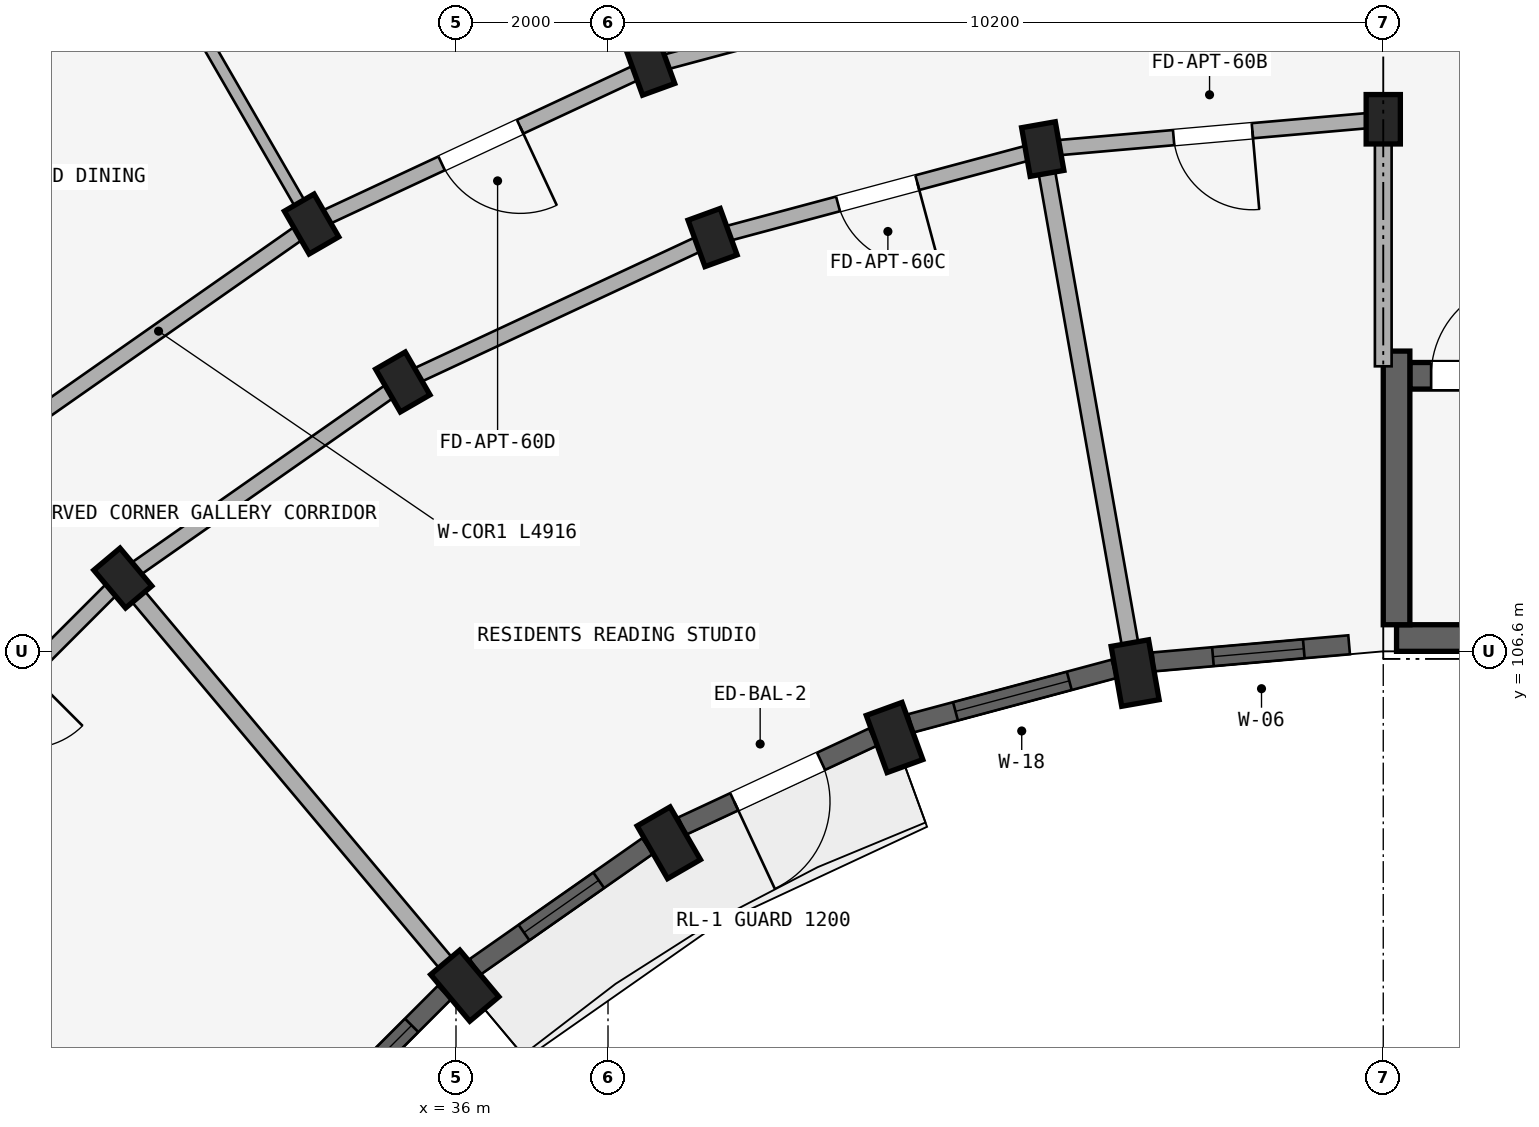
"""IFC4 building model, lengths in metres.
Left out: names, types, materials, properties, quantities, classifications, styles, units other than length and angle.
Written with IfcOpenShell. Run it as: python <this file> out.ifc"""

import sys

from ifc_helpers import new_model, si_unit, direction, frame, frame_2d, origin, origin_2d, place, context, subcontext, project, spatial, rectangle, extrude, element, fill, save


model = new_model("IFC4")
c1 = context("Model", 3, precision=1e-05, world=origin(), true_north=direction((0.0, 1.0)))
c2 = subcontext(c1, "Body", "Model", "MODEL_VIEW")
j1 = project(units=[si_unit("LENGTHUNIT", "METRE"), si_unit("PLANEANGLEUNIT", "RADIAN")], contexts=[c1])
p1 = place(None, origin())
s1 = spatial("IfcSite", under=j1, at=p1, CompositionType="ELEMENT")
p2 = place(p1, origin())
s2 = spatial("IfcBuilding", under=s1, at=p2, CompositionType="ELEMENT")
p3 = place(p2, frame((0.0, 0.0, 27.6)))
s3 = spatial("IfcBuildingStorey", under=s2, at=p3, CompositionType="ELEMENT", Elevation=27.6)
p4 = place(p3, frame((48.375, 106.775, 0.0), z_axis=(0.0, 0.0, 1.0), x_axis=(1.0, 0.0, 0.0)))
e1 = element("IfcWall", 1, at=p4, inside=s3, PredefinedType="SHEAR", context=c2, shape_type="SweptSolid", body=[
    extrude(rectangle(XDim=8.25, YDim=0.35, at=frame_2d((4.125, 0.0))), origin(), (0.0, 0.0, 1.0), 2.93),
])
p5 = place(p3, frame((48.55, 110.225, 0.0), z_axis=(0.0, 0.0, 1.0), x_axis=(1.0, 0.0, 0.0)))
e2 = element("IfcWall", 2, at=p5, inside=s3, PredefinedType="SHEAR", context=c2, shape_type="SweptSolid", body=[
    extrude(rectangle(XDim=7.9, YDim=0.35, at=frame_2d((3.95, 0.0))), origin(), (0.0, 0.0, 1.0), 2.93),
])
p6 = place(p5, frame((0.28, 0.0, 0.0)))
e3 = element("IfcOpeningElement", 3, at=p6, cuts=e2, PredefinedType="OPENING", context=c2, shape_type="SweptSolid", body=[
    extrude(rectangle(XDim=1.24, YDim=2.15, at=frame_2d((0.62, 1.075))), frame((0.0, 0.185, 0.0), z_axis=(0.0, -1.0, 0.0), x_axis=(1.0, 0.0, 0.0)), (0.0, 0.0, 1.0), 0.37),
])
p7 = place(p3, frame((48.375, 106.95, 0.0), z_axis=(0.0, 0.0, 1.0), x_axis=(0.0, 1.0, 0.0)))
e4 = element("IfcWall", 4, at=p7, inside=s3, PredefinedType="SHEAR", context=c2, shape_type="SweptSolid", body=[
    extrude(rectangle(XDim=3.6, YDim=0.35, at=frame_2d((1.8, 0.0))), origin(), (0.0, 0.0, 1.0), 2.93),
])
p8 = place(p3, frame((48.2, 113.6, 0.0), z_axis=(0.0, 0.0, 1.0), x_axis=(1.0, 0.0, 0.0)))
e5 = element("IfcColumn", 5, at=p8, inside=s3, PredefinedType="COLUMN", context=c2, shape_type="SweptSolid", body=[
    extrude(rectangle(XDim=0.45, YDim=0.65, at=origin_2d()), origin(), (0.0, 0.0, 1.0), 2.93),
])
p9 = place(p3, frame((44.935, 106.314, 0.0), z_axis=(0.0, 0.0, 1.0), x_axis=(0.984807753012, 0.173648177667, 0.0)))
e6 = element("IfcColumn", 6, at=p9, inside=s3, PredefinedType="COLUMN", context=c2, shape_type="SweptSolid", body=[
    extrude(rectangle(XDim=0.5, YDim=0.8, at=origin_2d()), origin(), (0.0, 0.0, 1.0), 2.93),
])
p10 = place(p3, frame((43.72, 113.208, 0.0), z_axis=(0.0, 0.0, 1.0), x_axis=(0.984807753012, 0.173648177667, 0.0)))
e7 = element("IfcColumn", 7, at=p10, inside=s3, PredefinedType="COLUMN", context=c2, shape_type="SweptSolid", body=[
    extrude(rectangle(XDim=0.45, YDim=0.65, at=origin_2d()), origin(), (0.0, 0.0, 1.0), 2.93),
])
p11 = place(p3, frame((41.77, 105.466, 0.0), z_axis=(0.0, 0.0, 1.0), x_axis=(0.939692620786, 0.342020143326, 0.0)))
e8 = element("IfcColumn", 8, at=p11, inside=s3, PredefinedType="COLUMN", context=c2, shape_type="SweptSolid", body=[
    extrude(rectangle(XDim=0.5, YDim=0.8, at=origin_2d()), origin(), (0.0, 0.0, 1.0), 2.93),
])
for number, where, z_axis, x_axis in (
    (9, (39.376, 112.044, 0.0), (0.0, 0.0, 1.0), (0.94, 0.342, 0.0)),
    (10, (38.555, 114.299, 0.0), (0.0, 0.0, 1.0), (0.94, 0.342, 0.0)),
):
    element("IfcColumn", number, at=place(p3, frame(where, z_axis=z_axis, x_axis=x_axis)), inside=s3, PredefinedType="COLUMN", context=c2, shape_type="SweptSolid", body=[
        extrude(rectangle(XDim=0.45, YDim=0.65, at=origin_2d()), origin(), (0.0, 0.0, 1.0), 2.93),
    ])
p12 = place(p3, frame((38.8, 104.081, 0.0), z_axis=(0.0, 0.0, 1.0), x_axis=(0.866025403784, 0.5, 0.0)))
e11 = element("IfcColumn", 11, at=p12, inside=s3, PredefinedType="COLUMN", context=c2, shape_type="SweptSolid", body=[
    extrude(rectangle(XDim=0.5, YDim=0.8, at=origin_2d()), origin(), (0.0, 0.0, 1.0), 2.93),
])
for number, where, z_axis, x_axis in (
    (12, (35.3, 110.144, 0.0), (0.0, 0.0, 1.0), (0.866, 0.5, 0.0)),
    (13, (34.1, 112.222, 0.0), (0.0, 0.0, 1.0), (0.866, 0.5, 0.0)),
):
    element("IfcColumn", number, at=place(p3, frame(where, z_axis=z_axis, x_axis=x_axis)), inside=s3, PredefinedType="COLUMN", context=c2, shape_type="SweptSolid", body=[
        extrude(rectangle(XDim=0.45, YDim=0.65, at=origin_2d()), origin(), (0.0, 0.0, 1.0), 2.93),
    ])
p13 = place(p3, frame((36.115, 102.202, 0.0), z_axis=(0.0, 0.0, 1.0), x_axis=(0.766044443119, 0.642787609687, 0.0)))
e14 = element("IfcColumn", 14, at=p13, inside=s3, PredefinedType="COLUMN", context=c2, shape_type="SweptSolid", body=[
    extrude(rectangle(XDim=0.5, YDim=0.8, at=origin_2d()), origin(), (0.0, 0.0, 1.0), 2.93),
])
p14 = place(p3, frame((31.616, 107.564, 0.0), z_axis=(0.0, 0.0, 1.0), x_axis=(0.766044443119, 0.642787609687, 0.0)))
e15 = element("IfcColumn", 15, at=p14, inside=s3, PredefinedType="COLUMN", context=c2, shape_type="SweptSolid", body=[
    extrude(rectangle(XDim=0.45, YDim=0.65, at=origin_2d()), origin(), (0.0, 0.0, 1.0), 2.93),
])
p15 = place(p3, frame((48.2, 113.6, 0.0), z_axis=(0.0, 0.0, 1.0), x_axis=(-0.996191949488, -0.087187153726, 0.0)))
e16 = element("IfcWall", 16, at=p15, inside=s3, PredefinedType="STANDARD", context=c2, shape_type="SweptSolid", body=[
    extrude(rectangle(XDim=4.497, YDim=0.2, at=frame_2d((2.249, 0.0))), origin(), (0.0, 0.0, 1.0), 2.372),
])
p16 = place(p15, frame((1.729, 0.0, 0.0)))
e17 = element("IfcOpeningElement", 17, at=p16, cuts=e16, PredefinedType="OPENING", context=c2, shape_type="SweptSolid", body=[
    extrude(rectangle(XDim=1.04, YDim=2.15, at=frame_2d((0.52, 1.075))), frame((0.0, 0.11, 0.0), z_axis=(0.0, -1.0, 0.0), x_axis=(1.0, 0.0, 0.0)), (0.0, 0.0, 1.0), 0.22),
])
p17 = place(p3, frame((43.72, 113.208, 0.0), z_axis=(0.0, 0.0, 1.0), x_axis=(-0.965934240054, -0.258787642463, 0.0)))
e18 = element("IfcWall", 18, at=p17, inside=s3, PredefinedType="STANDARD", context=c2, shape_type="SweptSolid", body=[
    extrude(rectangle(XDim=4.497, YDim=0.2, at=frame_2d((2.249, 0.0))), origin(), (0.0, 0.0, 1.0), 2.372),
])
p18 = place(p17, frame((1.709, 0.0, 0.0)))
e19 = element("IfcOpeningElement", 19, at=p18, cuts=e18, PredefinedType="OPENING", context=c2, shape_type="SweptSolid", body=[
    extrude(rectangle(XDim=1.08, YDim=2.15, at=frame_2d((0.54, 1.075))), frame((0.0, 0.11, 0.0), z_axis=(0.0, -1.0, 0.0), x_axis=(1.0, 0.0, 0.0)), (0.0, 0.0, 1.0), 0.22),
])
p19 = place(p3, frame((43.303, 115.572, 0.0), z_axis=(0.0, 0.0, 1.0), x_axis=(-0.965930095386, -0.258803112091, 0.0)))
e20 = element("IfcWall", 20, at=p19, inside=s3, PredefinedType="STANDARD", context=c2, shape_type="SweptSolid", body=[
    extrude(rectangle(XDim=4.916, YDim=0.2, at=frame_2d((2.458, 0.0))), origin(), (0.0, 0.0, 1.0), 2.372),
])
p20 = place(p3, frame((39.376, 112.044, 0.0), z_axis=(0.0, 0.0, 1.0), x_axis=(-0.906307919131, -0.422617978463, 0.0)))
e21 = element("IfcWall", 21, at=p20, inside=s3, PredefinedType="STANDARD", context=c2, shape_type="SweptSolid", body=[
    extrude(rectangle(XDim=4.497, YDim=0.2, at=frame_2d((2.249, 0.0))), origin(), (0.0, 0.0, 1.0), 2.372),
])
p21 = place(p3, frame((38.555, 114.299, 0.0), z_axis=(0.0, 0.0, 1.0), x_axis=(-0.906302381024, -0.422629854778, 0.0)))
e22 = element("IfcWall", 22, at=p21, inside=s3, PredefinedType="STANDARD", context=c2, shape_type="SweptSolid", body=[
    extrude(rectangle(XDim=4.915, YDim=0.2, at=frame_2d((2.458, 0.0))), origin(), (0.0, 0.0, 1.0), 2.372),
])
p22 = place(p21, frame((1.888, 0.0, 0.0)))
e23 = element("IfcOpeningElement", 23, at=p22, cuts=e22, PredefinedType="OPENING", context=c2, shape_type="SweptSolid", body=[
    extrude(rectangle(XDim=1.14, YDim=2.15, at=frame_2d((0.57, 1.075))), frame((0.0, 0.11, 0.0), z_axis=(0.0, -1.0, 0.0), x_axis=(1.0, 0.0, 0.0)), (0.0, 0.0, 1.0), 0.22),
])
p23 = place(p3, frame((35.3, 110.144, 0.0), z_axis=(0.0, 0.0, 1.0), x_axis=(-0.819155404658, -0.573571637217, 0.0)))
e24 = element("IfcWall", 24, at=p23, inside=s3, PredefinedType="STANDARD", context=c2, shape_type="SweptSolid", body=[
    extrude(rectangle(XDim=4.497, YDim=0.2, at=frame_2d((2.249, 0.0))), origin(), (0.0, 0.0, 1.0), 2.372),
])
p24 = place(p3, frame((34.1, 112.222, 0.0), z_axis=(0.0, 0.0, 1.0), x_axis=(-0.819140911474, -0.573592335331, 0.0)))
e25 = element("IfcWall", 25, at=p24, inside=s3, PredefinedType="STANDARD", context=c2, shape_type="SweptSolid", body=[
    extrude(rectangle(XDim=4.916, YDim=0.2, at=frame_2d((2.458, 0.0))), origin(), (0.0, 0.0, 1.0), 2.372),
])
p25 = place(p3, frame((31.616, 107.564, 0.0), z_axis=(0.0, 0.0, 1.0), x_axis=(-0.707106781187, -0.707106781187, 0.0)))
e26 = element("IfcWall", 26, at=p25, inside=s3, PredefinedType="STANDARD", context=c2, shape_type="SweptSolid", body=[
    extrude(rectangle(XDim=4.497, YDim=0.2, at=frame_2d((2.249, 0.0))), origin(), (0.0, 0.0, 1.0), 2.372),
])
p26 = place(p25, frame((1.749, 0.0, 0.0)))
e27 = element("IfcOpeningElement", 27, at=p26, cuts=e26, PredefinedType="OPENING", context=c2, shape_type="SweptSolid", body=[
    extrude(rectangle(XDim=1.0, YDim=2.15, at=frame_2d((0.5, 1.075))), frame((0.0, 0.11, 0.0), z_axis=(0.0, -1.0, 0.0), x_axis=(1.0, 0.0, 0.0)), (0.0, 0.0, 1.0), 0.22),
])
p27 = place(p3, frame((48.2, 110.35, 0.0), z_axis=(0.0, 0.0, 1.0), x_axis=(0.0, 1.0, 0.0)))
e28 = element("IfcWall", 28, at=p27, inside=s3, PredefinedType="STANDARD", context=c2, shape_type="SweptSolid", body=[
    extrude(rectangle(XDim=3.2, YDim=0.22, at=frame_2d((1.6, 0.0))), origin(), (0.0, 0.0, 1.0), 2.372),
])
p28 = place(p3, frame((44.901, 106.511, 0.0), z_axis=(0.0, 0.0, 1.0), x_axis=(-0.173647089161, 0.984807944945, 0.0)))
e29 = element("IfcWall", 29, at=p28, inside=s3, PredefinedType="STANDARD", context=c2, shape_type="SweptSolid", body=[
    extrude(rectangle(XDim=6.75, YDim=0.22, at=frame_2d((3.375, 0.0))), origin(), (0.0, 0.0, 1.0), 2.372),
])
p29 = place(p3, frame((38.521, 114.393, 0.0), z_axis=(0.0, 0.0, 1.0), x_axis=(-0.342022120477, 0.939691901159, 0.0)))
e30 = element("IfcWall", 30, at=p29, inside=s3, PredefinedType="STANDARD", context=c2, shape_type="SweptSolid", body=[
    extrude(rectangle(XDim=17.42, YDim=0.22, at=frame_2d((8.71, 0.0))), origin(), (0.0, 0.0, 1.0), 2.372),
])
p30 = place(p3, frame((34.05, 112.309, 0.0), z_axis=(0.0, 0.0, 1.0), x_axis=(-0.499997843263, 0.866026648973, 0.0)))
e31 = element("IfcWall", 31, at=p30, inside=s3, PredefinedType="PARTITIONING", context=c2, shape_type="SweptSolid", body=[
    extrude(rectangle(XDim=17.42, YDim=0.15, at=frame_2d((8.71, 0.0))), origin(), (0.0, 0.0, 1.0), 2.372),
])
p31 = place(p30, frame((4.45, 0.0, 0.0)))
e32 = element("IfcOpeningElement", 32, at=p31, cuts=e31, PredefinedType="OPENING", context=c2, shape_type="SweptSolid", body=[
    extrude(rectangle(XDim=0.8, YDim=2.1, at=frame_2d((0.4, 1.05))), frame((0.0, 0.085, 0.0), z_axis=(0.0, -1.0, 0.0), x_axis=(1.0, 0.0, 0.0)), (0.0, 0.0, 1.0), 0.17),
])
p32 = place(p3, frame((35.987, 102.355, 0.0), z_axis=(0.0, 0.0, 1.0), x_axis=(-0.642784846501, 0.766046761698, 0.0)))
e33 = element("IfcWall", 33, at=p32, inside=s3, PredefinedType="STANDARD", context=c2, shape_type="SweptSolid", body=[
    extrude(rectangle(XDim=6.75, YDim=0.22, at=frame_2d((3.375, 0.0))), origin(), (0.0, 0.0, 1.0), 2.372),
])
p33 = place(p3, frame((30.8, 117.938, 0.0), z_axis=(0.0, 0.0, 1.0), x_axis=(-0.81913926159, -0.573594691504, 0.0)))
e34 = element("IfcWall", 34, at=p33, inside=s3, PredefinedType="PLUMBINGWALL", context=c2, shape_type="SweptSolid", body=[
    extrude(rectangle(XDim=6.066, YDim=0.15, at=frame_2d((3.033, 0.0))), origin(), (0.0, 0.0, 1.0), 2.372),
])
p34 = place(p33, frame((2.653, 0.0, 0.0)))
e35 = element("IfcOpeningElement", 35, at=p34, cuts=e34, PredefinedType="OPENING", context=c2, shape_type="SweptSolid", body=[
    extrude(rectangle(XDim=0.76, YDim=2.05, at=frame_2d((0.38, 1.025))), frame((0.0, 0.085, 0.0), z_axis=(0.0, -1.0, 0.0), x_axis=(1.0, 0.0, 0.0)), (0.0, 0.0, 1.0), 0.17),
])
p35 = place(p3, frame((47.751, 106.686, 0.0), z_axis=(0.0, 0.0, 1.0), x_axis=(-0.996188278786, -0.087229084652, 0.0)))
e36 = element("IfcWall", 36, at=p35, inside=s3, PredefinedType="STANDARD", context=c2, shape_type="SweptSolid", body=[
    extrude(rectangle(XDim=2.583, YDim=0.25, at=frame_2d((1.292, 0.0))), origin(), (0.0, 0.0, 1.0), 2.472),
])
p36 = place(p35, frame((0.599, 0.0, 0.772)))
e37 = element("IfcOpeningElement", 37, at=p36, cuts=e36, PredefinedType="OPENING", context=c2, shape_type="SweptSolid", body=[
    extrude(rectangle(XDim=1.2, YDim=1.5, at=frame_2d((0.6, 0.75))), frame((0.0, 0.135, 0.0), z_axis=(0.0, -1.0, 0.0), x_axis=(1.0, 0.0, 0.0)), (0.0, 0.0, 1.0), 0.27),
])
p37 = place(p3, frame((44.658, 106.369, 0.0), z_axis=(0.0, 0.0, 1.0), x_axis=(-0.965935855992, -0.25878161084, 0.0)))
e38 = element("IfcWall", 38, at=p37, inside=s3, PredefinedType="STANDARD", context=c2, shape_type="SweptSolid", body=[
    extrude(rectangle(XDim=2.77, YDim=0.25, at=frame_2d((1.385, 0.0))), origin(), (0.0, 0.0, 1.0), 2.472),
])
p38 = place(p37, frame((0.61, 0.0, 0.672)))
e39 = element("IfcOpeningElement", 39, at=p38, cuts=e38, PredefinedType="OPENING", context=c2, shape_type="SweptSolid", body=[
    extrude(rectangle(XDim=1.55, YDim=1.6, at=frame_2d((0.775, 0.8))), frame((0.0, 0.135, 0.0), z_axis=(0.0, -1.0, 0.0), x_axis=(1.0, 0.0, 0.0)), (0.0, 0.0, 1.0), 0.27),
])
p39 = place(p3, frame((41.487, 105.472, 0.0), z_axis=(0.0, 0.0, 1.0), x_axis=(-0.906293449611, -0.422649007088, 0.0)))
e40 = element("IfcWall", 40, at=p39, inside=s3, PredefinedType="STANDARD", context=c2, shape_type="SweptSolid", body=[
    extrude(rectangle(XDim=2.77, YDim=0.25, at=frame_2d((1.385, 0.0))), origin(), (0.0, 0.0, 1.0), 2.472),
])
p40 = place(p39, frame((0.755, 0.0, 0.0)))
e41 = element("IfcOpeningElement", 41, at=p40, cuts=e40, PredefinedType="OPENING", context=c2, shape_type="SweptSolid", body=[
    extrude(rectangle(XDim=1.26, YDim=2.15, at=frame_2d((0.63, 1.075))), frame((0.0, 0.135, 0.0), z_axis=(0.0, -1.0, 0.0), x_axis=(1.0, 0.0, 0.0)), (0.0, 0.0, 1.0), 0.27),
])
p41 = place(p3, frame((38.521, 104.038, 0.0), z_axis=(0.0, 0.0, 1.0), x_axis=(-0.819111815273, -0.573633885053, 0.0)))
e42 = element("IfcWall", 42, at=p41, inside=s3, PredefinedType="STANDARD", context=c2, shape_type="SweptSolid", body=[
    extrude(rectangle(XDim=2.77, YDim=0.25, at=frame_2d((1.385, 0.0))), origin(), (0.0, 0.0, 1.0), 2.472),
])
p42 = place(p41, frame((0.785, 0.0, 0.772)))
e43 = element("IfcOpeningElement", 43, at=p42, cuts=e42, PredefinedType="OPENING", context=c2, shape_type="SweptSolid", body=[
    extrude(rectangle(XDim=1.2, YDim=1.5, at=frame_2d((0.6, 0.75))), frame((0.0, 0.135, 0.0), z_axis=(0.0, -1.0, 0.0), x_axis=(1.0, 0.0, 0.0)), (0.0, 0.0, 1.0), 0.27),
])
p43 = place(p3, frame((35.848, 102.111, 0.0), z_axis=(0.0, 0.0, 1.0), x_axis=(-0.707106781187, -0.707106781187, 0.0)))
e44 = element("IfcWall", 44, at=p43, inside=s3, PredefinedType="STANDARD", context=c2, shape_type="SweptSolid", body=[
    extrude(rectangle(XDim=2.77, YDim=0.25, at=frame_2d((1.385, 0.0))), origin(), (0.0, 0.0, 1.0), 2.472),
])
p44 = place(p43, frame((0.61, 0.0, 0.672)))
e45 = element("IfcOpeningElement", 45, at=p44, cuts=e44, PredefinedType="OPENING", context=c2, shape_type="SweptSolid", body=[
    extrude(rectangle(XDim=1.55, YDim=1.6, at=frame_2d((0.775, 0.8))), frame((0.0, 0.135, 0.0), z_axis=(0.0, -1.0, 0.0), x_axis=(1.0, 0.0, 0.0)), (0.0, 0.0, 1.0), 0.27),
])
p45 = place(p36, origin())
e46 = element("IfcWindow", 46, at=p45, inside=s3, PartitioningType="SINGLE_PANEL", PredefinedType="WINDOW", context=c2, shape_type="SweptSolid", body=[
    extrude(rectangle(XDim=1.2, YDim=1.5, at=frame_2d((0.6, 0.75))), frame((0.0, 0.03, 0.0), z_axis=(0.0, -1.0, 0.0), x_axis=(1.0, 0.0, 0.0)), (0.0, 0.0, 1.0), 0.06),
])
fill(e37, e46)
p46 = place(p38, origin())
e47 = element("IfcWindow", 47, at=p46, inside=s3, PartitioningType="DOUBLE_PANEL_VERTICAL", PredefinedType="WINDOW", context=c2, shape_type="SweptSolid", body=[
    extrude(rectangle(XDim=1.55, YDim=1.6, at=frame_2d((0.775, 0.8))), frame((0.0, 0.03, 0.0), z_axis=(0.0, -1.0, 0.0), x_axis=(1.0, 0.0, 0.0)), (0.0, 0.0, 1.0), 0.06),
])
fill(e39, e47)
p47 = place(p42, origin())
e48 = element("IfcWindow", 48, at=p47, inside=s3, PartitioningType="SINGLE_PANEL", PredefinedType="WINDOW", context=c2, shape_type="SweptSolid", body=[
    extrude(rectangle(XDim=1.2, YDim=1.5, at=frame_2d((0.6, 0.75))), frame((0.0, 0.03, 0.0), z_axis=(0.0, -1.0, 0.0), x_axis=(1.0, 0.0, 0.0)), (0.0, 0.0, 1.0), 0.06),
])
fill(e43, e48)
p48 = place(p44, origin())
e49 = element("IfcWindow", 49, at=p48, inside=s3, PartitioningType="DOUBLE_PANEL_VERTICAL", PredefinedType="WINDOW", context=c2, shape_type="SweptSolid", body=[
    extrude(rectangle(XDim=1.55, YDim=1.6, at=frame_2d((0.775, 0.8))), frame((0.0, 0.03, 0.0), z_axis=(0.0, -1.0, 0.0), x_axis=(1.0, 0.0, 0.0)), (0.0, 0.0, 1.0), 0.06),
])
fill(e45, e49)
p49 = place(p6, frame((1.24, 0.0, 0.0), z_axis=(0.0, 0.0, 1.0), x_axis=(-1.0, 0.0, 0.0)))
e50 = element("IfcDoor", 50, at=p49, inside=s3, OperationType="SINGLE_SWING_LEFT", PredefinedType="DOOR", context=c2, shape_type="SweptSolid", body=[
    extrude(rectangle(XDim=1.24, YDim=2.15, at=frame_2d((0.62, 1.075))), frame((0.0, 0.025, 0.0), z_axis=(0.0, -1.0, 0.0), x_axis=(1.0, 0.0, 0.0)), (0.0, 0.0, 1.0), 0.05),
])
fill(e3, e50)
p50 = place(p22, frame((1.14, 0.0, 0.0), z_axis=(0.0, 0.0, 1.0), x_axis=(-1.0, 0.0, 0.0)))
e51 = element("IfcDoor", 51, at=p50, inside=s3, OperationType="SINGLE_SWING_RIGHT", PredefinedType="DOOR", context=c2, shape_type="SweptSolid", body=[
    extrude(rectangle(XDim=1.14, YDim=2.15, at=frame_2d((0.57, 1.075))), frame((0.0, 0.025, 0.0), z_axis=(0.0, -1.0, 0.0), x_axis=(1.0, 0.0, 0.0)), (0.0, 0.0, 1.0), 0.05),
])
fill(e23, e51)
p51 = place(p16, origin())
e52 = element("IfcDoor", 52, at=p51, inside=s3, OperationType="SINGLE_SWING_LEFT", PredefinedType="DOOR", context=c2, shape_type="SweptSolid", body=[
    extrude(rectangle(XDim=1.04, YDim=2.15, at=frame_2d((0.52, 1.075))), frame((0.0, 0.025, 0.0), z_axis=(0.0, -1.0, 0.0), x_axis=(1.0, 0.0, 0.0)), (0.0, 0.0, 1.0), 0.05),
])
fill(e17, e52)
p52 = place(p18, frame((1.08, 0.0, 0.0), z_axis=(0.0, 0.0, 1.0), x_axis=(-1.0, 0.0, 0.0)))
e53 = element("IfcDoor", 53, at=p52, inside=s3, OperationType="SINGLE_SWING_RIGHT", PredefinedType="DOOR", context=c2, shape_type="SweptSolid", body=[
    extrude(rectangle(XDim=1.08, YDim=2.15, at=frame_2d((0.54, 1.075))), frame((0.0, 0.025, 0.0), z_axis=(0.0, -1.0, 0.0), x_axis=(1.0, 0.0, 0.0)), (0.0, 0.0, 1.0), 0.05),
])
fill(e19, e53)
p53 = place(p40, origin())
e54 = element("IfcDoor", 54, at=p53, inside=s3, OperationType="SINGLE_SWING_RIGHT", PredefinedType="DOOR", context=c2, shape_type="SweptSolid", body=[
    extrude(rectangle(XDim=1.26, YDim=2.15, at=frame_2d((0.63, 1.075))), frame((0.0, 0.025, 0.0), z_axis=(0.0, -1.0, 0.0), x_axis=(1.0, 0.0, 0.0)), (0.0, 0.0, 1.0), 0.05),
])
fill(e41, e54)
save(model, sys.argv[1])
